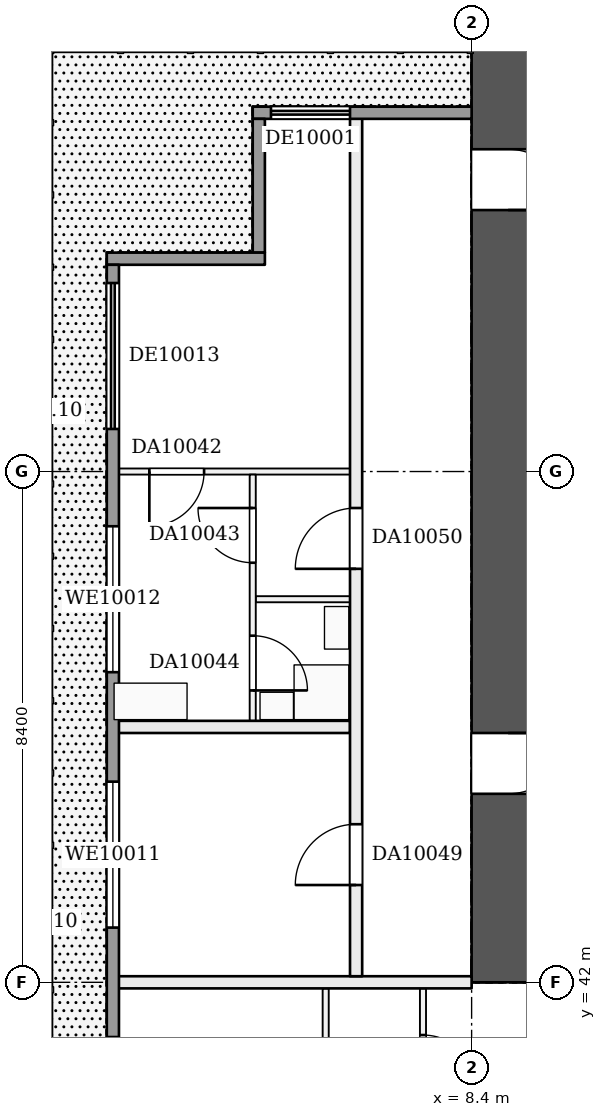
"""IFC4 building model, lengths in metres.
Left out: names, types, materials, properties, quantities, classifications, styles, units other than length and angle.
Written with IfcOpenShell. Run it as: python <this file> out.ifc"""

import sys

from ifc_helpers import new_model, si_unit, direction, frame, frame_2d, origin, place, context, subcontext, project, spatial, rectangle, extrude, element, fill, save


model = new_model("IFC4")
c1 = context("Model", 3, precision=1e-05, world=origin(), true_north=direction((0.0, 1.0)))
c2 = subcontext(c1, "Body", "Model", "MODEL_VIEW")
j1 = project(units=[si_unit("LENGTHUNIT", "METRE"), si_unit("PLANEANGLEUNIT", "RADIAN")], contexts=[c1])
p1 = place(None, origin())
s1 = spatial("IfcSite", under=j1, at=p1, CompositionType="ELEMENT")
p2 = place(p1, origin())
s2 = spatial("IfcBuilding", under=s1, at=p2, CompositionType="ELEMENT")
p3 = place(p2, frame((0.0, 0.0, 46.2)))
s3 = spatial("IfcBuildingStorey", under=s2, at=p3, CompositionType="ELEMENT", Elevation=46.2)
p4 = place(p3, frame((9.0, 58.8, 0.0), z_axis=(0.0, 0.0, 1.0), x_axis=(0.0, -1.0, 0.0)))
e1 = element("IfcWall", 1, at=p4, inside=s3, PredefinedType="SHEAR", context=c2, shape_type="SweptSolid", body=[
    extrude(rectangle(XDim=16.8, YDim=1.2, at=frame_2d((8.4, 0.0))), origin(), (0.0, 0.0, 1.0), 3.22),
])
p5 = place(p4, frame((3.1, 0.0, 0.0)))
e2 = element("IfcOpeningElement", 2, at=p5, cuts=e1, PredefinedType="OPENING", context=c2, shape_type="SweptSolid", body=[
    extrude(rectangle(XDim=1.0, YDim=2.1, at=frame_2d((0.5, 1.05))), frame((0.0, 0.61, 0.0), z_axis=(0.0, -1.0, 0.0), x_axis=(1.0, 0.0, 0.0)), (0.0, 0.0, 1.0), 1.22),
])
p6 = place(p4, frame((12.7, 0.0, 0.0)))
e3 = element("IfcOpeningElement", 3, at=p6, cuts=e1, PredefinedType="OPENING", context=c2, shape_type="SweptSolid", body=[
    extrude(rectangle(XDim=1.0, YDim=2.1, at=frame_2d((0.5, 1.05))), frame((0.0, 0.61, 0.0), z_axis=(0.0, -1.0, 0.0), x_axis=(1.0, 0.0, 0.0)), (0.0, 0.0, 1.0), 1.22),
])
p7 = place(p3, frame((2.5, 42.0, 0.0), z_axis=(0.0, 0.0, 1.0), x_axis=(1.0, 0.0, 0.0)))
e4 = element("IfcWall", 4, at=p7, inside=s3, PredefinedType="PARTITIONING", context=c2, shape_type="SweptSolid", body=[
    extrude(rectangle(XDim=5.9, YDim=0.2, at=frame_2d((2.95, 0.0))), origin(), (0.0, 0.0, 1.0), 3.22),
])
p8 = place(p3, frame((2.5, 46.2, 0.0), z_axis=(0.0, 0.0, 1.0), x_axis=(1.0, 0.0, 0.0)))
e5 = element("IfcWall", 5, at=p8, inside=s3, PredefinedType="PARTITIONING", context=c2, shape_type="SweptSolid", body=[
    extrude(rectangle(XDim=3.9, YDim=0.2, at=frame_2d((1.95, 0.0))), origin(), (0.0, 0.0, 1.0), 3.22),
])
p9 = place(p3, frame((4.85, 48.3, 0.0), z_axis=(0.0, 0.0, 1.0), x_axis=(1.0, 0.0, 0.0)))
e6 = element("IfcWall", 6, at=p9, inside=s3, PredefinedType="PARTITIONING", context=c2, shape_type="SweptSolid", body=[
    extrude(rectangle(XDim=1.55, YDim=0.1, at=frame_2d((0.775, 0.0))), origin(), (0.0, 0.0, 1.0), 3.22),
])
p10 = place(p3, frame((2.5, 50.4, 0.0), z_axis=(0.0, 0.0, 1.0), x_axis=(1.0, 0.0, 0.0)))
e7 = element("IfcWall", 7, at=p10, inside=s3, PredefinedType="PARTITIONING", context=c2, shape_type="SweptSolid", body=[
    extrude(rectangle(XDim=3.9, YDim=0.1, at=frame_2d((1.95, 0.0))), origin(), (0.0, 0.0, 1.0), 3.22),
])
p11 = place(p10, frame((0.6, 0.0, 0.0)))
e8 = element("IfcOpeningElement", 8, at=p11, cuts=e7, PredefinedType="OPENING", context=c2, shape_type="SweptSolid", body=[
    extrude(rectangle(XDim=0.9, YDim=2.1, at=frame_2d((0.45, 1.05))), frame((0.0, 0.06, 0.0), z_axis=(0.0, -1.0, 0.0), x_axis=(1.0, 0.0, 0.0)), (0.0, 0.0, 1.0), 0.12),
])
p12 = place(p3, frame((4.8, 46.3, 0.0), z_axis=(0.0, 0.0, 1.0), x_axis=(0.0, 1.0, 0.0)))
e9 = element("IfcWall", 9, at=p12, inside=s3, PredefinedType="PARTITIONING", context=c2, shape_type="SweptSolid", body=[
    extrude(rectangle(XDim=4.05, YDim=0.1, at=frame_2d((2.025, 0.0))), origin(), (0.0, 0.0, 1.0), 3.22),
])
p13 = place(p12, frame((2.6, 0.0, 0.0)))
e10 = element("IfcOpeningElement", 10, at=p13, cuts=e9, PredefinedType="OPENING", context=c2, shape_type="SweptSolid", body=[
    extrude(rectangle(XDim=0.9, YDim=2.1, at=frame_2d((0.45, 1.05))), frame((0.0, 0.06, 0.0), z_axis=(0.0, -1.0, 0.0), x_axis=(1.0, 0.0, 0.0)), (0.0, 0.0, 1.0), 0.12),
])
p14 = place(p12, frame((0.5, 0.0, 0.0)))
e11 = element("IfcOpeningElement", 11, at=p14, cuts=e9, PredefinedType="OPENING", context=c2, shape_type="SweptSolid", body=[
    extrude(rectangle(XDim=0.9, YDim=2.1, at=frame_2d((0.45, 1.05))), frame((0.0, 0.06, 0.0), z_axis=(0.0, -1.0, 0.0), x_axis=(1.0, 0.0, 0.0)), (0.0, 0.0, 1.0), 0.12),
])
p15 = place(p3, frame((6.0, 33.7, 0.0), z_axis=(0.0, 0.0, 1.0), x_axis=(0.0, 1.0, 0.0)))
e12 = element("IfcWall", 12, at=p15, inside=s3, PredefinedType="PARTITIONING", context=c2, shape_type="SweptSolid", body=[
    extrude(rectangle(XDim=8.2, YDim=0.1, at=frame_2d((4.1, 0.0))), origin(), (0.0, 0.0, 1.0), 3.22),
])
p16 = place(p15, frame((1.5, 0.0, 0.0)))
e13 = element("IfcOpeningElement", 13, at=p16, cuts=e12, PredefinedType="OPENING", context=c2, shape_type="SweptSolid", body=[
    extrude(rectangle(XDim=0.9, YDim=2.1, at=frame_2d((0.45, 1.05))), frame((0.0, 0.06, 0.0), z_axis=(0.0, -1.0, 0.0), x_axis=(1.0, 0.0, 0.0)), (0.0, 0.0, 1.0), 0.12),
])
p17 = place(p15, frame((5.7, 0.0, 0.0)))
e14 = element("IfcOpeningElement", 14, at=p17, cuts=e12, PredefinedType="OPENING", context=c2, shape_type="SweptSolid", body=[
    extrude(rectangle(XDim=0.9, YDim=2.1, at=frame_2d((0.45, 1.05))), frame((0.0, 0.06, 0.0), z_axis=(0.0, -1.0, 0.0), x_axis=(1.0, 0.0, 0.0)), (0.0, 0.0, 1.0), 0.12),
])
p18 = place(p3, frame((6.5, 42.1, 0.0), z_axis=(0.0, 0.0, 1.0), x_axis=(0.0, 1.0, 0.0)))
e15 = element("IfcWall", 15, at=p18, inside=s3, PredefinedType="PARTITIONING", context=c2, shape_type="SweptSolid", body=[
    extrude(rectangle(XDim=14.2, YDim=0.2, at=frame_2d((7.1, 0.0))), origin(), (0.0, 0.0, 1.0), 3.22),
])
p19 = place(p18, frame((1.5, 0.0, 0.0)))
e16 = element("IfcOpeningElement", 16, at=p19, cuts=e15, PredefinedType="OPENING", context=c2, shape_type="SweptSolid", body=[
    extrude(rectangle(XDim=1.0, YDim=2.1, at=frame_2d((0.5, 1.05))), frame((0.0, 0.11, 0.0), z_axis=(0.0, -1.0, 0.0), x_axis=(1.0, 0.0, 0.0)), (0.0, 0.0, 1.0), 0.22),
])
p20 = place(p18, frame((6.7, 0.0, 0.0)))
e17 = element("IfcOpeningElement", 17, at=p20, cuts=e15, PredefinedType="OPENING", context=c2, shape_type="SweptSolid", body=[
    extrude(rectangle(XDim=1.0, YDim=2.1, at=frame_2d((0.5, 1.05))), frame((0.0, 0.11, 0.0), z_axis=(0.0, -1.0, 0.0), x_axis=(1.0, 0.0, 0.0)), (0.0, 0.0, 1.0), 0.22),
])
p21 = place(p3, frame((7.6, 33.7, 0.0), z_axis=(0.0, 0.0, 1.0), x_axis=(0.0, 1.0, 0.0)))
e18 = element("IfcWall", 18, at=p21, inside=s3, PredefinedType="PARTITIONING", context=c2, shape_type="SweptSolid", body=[
    extrude(rectangle(XDim=8.2, YDim=0.1, at=frame_2d((4.1, 0.0))), origin(), (0.0, 0.0, 1.0), 3.22),
])
p22 = place(p21, frame((0.8, 0.0, 0.0)))
e19 = element("IfcOpeningElement", 19, at=p22, cuts=e18, PredefinedType="OPENING", context=c2, shape_type="SweptSolid", body=[
    extrude(rectangle(XDim=0.9, YDim=2.1, at=frame_2d((0.45, 1.05))), frame((0.0, 0.06, 0.0), z_axis=(0.0, -1.0, 0.0), x_axis=(1.0, 0.0, 0.0)), (0.0, 0.0, 1.0), 0.12),
])
p23 = place(p21, frame((3.567, 0.0, 0.0)))
e20 = element("IfcOpeningElement", 20, at=p23, cuts=e18, PredefinedType="OPENING", context=c2, shape_type="SweptSolid", body=[
    extrude(rectangle(XDim=0.9, YDim=2.1, at=frame_2d((0.45, 1.05))), frame((0.0, 0.06, 0.0), z_axis=(0.0, -1.0, 0.0), x_axis=(1.0, 0.0, 0.0)), (0.0, 0.0, 1.0), 0.12),
])
p24 = place(p21, frame((6.533, 0.0, 0.0)))
e21 = element("IfcOpeningElement", 21, at=p24, cuts=e18, PredefinedType="OPENING", context=c2, shape_type="SweptSolid", body=[
    extrude(rectangle(XDim=0.9, YDim=2.1, at=frame_2d((0.45, 1.05))), frame((0.0, 0.06, 0.0), z_axis=(0.0, -1.0, 0.0), x_axis=(1.0, 0.0, 0.0)), (0.0, 0.0, 1.0), 0.12),
])
p25 = place(p3, frame((8.4, 56.3, 0.0), z_axis=(0.0, 0.0, 1.0), x_axis=(-1.0, 0.0, 0.0)))
e22 = element("IfcWall", 22, at=p25, inside=s3, PredefinedType="SOLIDWALL", context=c2, shape_type="SweptSolid", body=[
    extrude(rectangle(XDim=3.6, YDim=0.2, at=frame_2d((1.8, 0.0))), origin(), (0.0, 0.0, 1.0), 3.22),
])
p26 = place(p25, frame((2.0, 0.0, 0.0)))
e23 = element("IfcOpeningElement", 23, at=p26, cuts=e22, PredefinedType="OPENING", context=c2, shape_type="SweptSolid", body=[
    extrude(rectangle(XDim=1.3, YDim=2.2, at=frame_2d((0.65, 1.1))), frame((0.0, 0.11, 0.0), z_axis=(0.0, -1.0, 0.0), x_axis=(1.0, 0.0, 0.0)), (0.0, 0.0, 1.0), 0.22),
])
p27 = place(p3, frame((4.9, 56.2, 0.0), z_axis=(0.0, 0.0, 1.0), x_axis=(0.0, -1.0, 0.0)))
e24 = element("IfcWall", 24, at=p27, inside=s3, PredefinedType="SOLIDWALL", context=c2, shape_type="SweptSolid", body=[
    extrude(rectangle(XDim=2.2, YDim=0.2, at=frame_2d((1.1, 0.0))), origin(), (0.0, 0.0, 1.0), 3.22),
])
p28 = place(p3, frame((5.0, 53.9, 0.0), z_axis=(0.0, 0.0, 1.0), x_axis=(-1.0, 0.0, 0.0)))
e25 = element("IfcWall", 25, at=p28, inside=s3, PredefinedType="SOLIDWALL", context=c2, shape_type="SweptSolid", body=[
    extrude(rectangle(XDim=2.6, YDim=0.2, at=frame_2d((1.3, 0.0))), origin(), (0.0, 0.0, 1.0), 3.22),
])
p29 = place(p3, frame((2.5, 53.8, 0.0), z_axis=(0.0, 0.0, 1.0), x_axis=(0.0, -1.0, 0.0)))
e26 = element("IfcWall", 26, at=p29, inside=s3, PredefinedType="SOLIDWALL", context=c2, shape_type="SweptSolid", body=[
    extrude(rectangle(XDim=48.8, YDim=0.2, at=frame_2d((24.4, 0.0))), origin(), (0.0, 0.0, 1.0), 3.22),
])
p30 = place(p29, frame((46.1, 0.0, 0.0)))
e27 = element("IfcOpeningElement", 27, at=p30, cuts=e26, PredefinedType="OPENING", context=c2, shape_type="SweptSolid", body=[
    extrude(rectangle(XDim=2.4, YDim=2.2, at=frame_2d((1.2, 1.1))), frame((0.0, 0.11, 0.0), z_axis=(0.0, -1.0, 0.0), x_axis=(1.0, 0.0, 0.0)), (0.0, 0.0, 1.0), 0.22),
])
p31 = place(p29, frame((42.1, 0.0, 0.0)))
e28 = element("IfcOpeningElement", 28, at=p31, cuts=e26, PredefinedType="OPENING", context=c2, shape_type="SweptSolid", body=[
    extrude(rectangle(XDim=2.4, YDim=2.2, at=frame_2d((1.2, 1.1))), frame((0.0, 0.11, 0.0), z_axis=(0.0, -1.0, 0.0), x_axis=(1.0, 0.0, 0.0)), (0.0, 0.0, 1.0), 0.22),
])
p32 = place(p29, frame((37.9, 0.0, 0.0)))
e29 = element("IfcOpeningElement", 29, at=p32, cuts=e26, PredefinedType="OPENING", context=c2, shape_type="SweptSolid", body=[
    extrude(rectangle(XDim=2.4, YDim=2.2, at=frame_2d((1.2, 1.1))), frame((0.0, 0.11, 0.0), z_axis=(0.0, -1.0, 0.0), x_axis=(1.0, 0.0, 0.0)), (0.0, 0.0, 1.0), 0.22),
])
p33 = place(p29, frame((33.7, 0.0, 0.0)))
e30 = element("IfcOpeningElement", 30, at=p33, cuts=e26, PredefinedType="OPENING", context=c2, shape_type="SweptSolid", body=[
    extrude(rectangle(XDim=2.4, YDim=2.2, at=frame_2d((1.2, 1.1))), frame((0.0, 0.11, 0.0), z_axis=(0.0, -1.0, 0.0), x_axis=(1.0, 0.0, 0.0)), (0.0, 0.0, 1.0), 0.22),
])
p34 = place(p29, frame((29.5, 0.0, 0.9)))
e31 = element("IfcOpeningElement", 31, at=p34, cuts=e26, PredefinedType="OPENING", context=c2, shape_type="SweptSolid", body=[
    extrude(rectangle(XDim=2.4, YDim=1.5, at=frame_2d((1.2, 0.75))), frame((0.0, 0.11, 0.0), z_axis=(0.0, -1.0, 0.0), x_axis=(1.0, 0.0, 0.0)), (0.0, 0.0, 1.0), 0.22),
])
p35 = place(p29, frame((25.3, 0.0, 0.9)))
e32 = element("IfcOpeningElement", 32, at=p35, cuts=e26, PredefinedType="OPENING", context=c2, shape_type="SweptSolid", body=[
    extrude(rectangle(XDim=2.4, YDim=1.5, at=frame_2d((1.2, 0.75))), frame((0.0, 0.11, 0.0), z_axis=(0.0, -1.0, 0.0), x_axis=(1.0, 0.0, 0.0)), (0.0, 0.0, 1.0), 0.22),
])
p36 = place(p29, frame((21.1, 0.0, 0.0)))
e33 = element("IfcOpeningElement", 33, at=p36, cuts=e26, PredefinedType="OPENING", context=c2, shape_type="SweptSolid", body=[
    extrude(rectangle(XDim=2.4, YDim=2.2, at=frame_2d((1.2, 1.1))), frame((0.0, 0.11, 0.0), z_axis=(0.0, -1.0, 0.0), x_axis=(1.0, 0.0, 0.0)), (0.0, 0.0, 1.0), 0.22),
])
p37 = place(p29, frame((16.9, 0.0, 0.0)))
e34 = element("IfcOpeningElement", 34, at=p37, cuts=e26, PredefinedType="OPENING", context=c2, shape_type="SweptSolid", body=[
    extrude(rectangle(XDim=2.4, YDim=2.2, at=frame_2d((1.2, 1.1))), frame((0.0, 0.11, 0.0), z_axis=(0.0, -1.0, 0.0), x_axis=(1.0, 0.0, 0.0)), (0.0, 0.0, 1.0), 0.22),
])
p38 = place(p29, frame((12.7, 0.0, 0.9)))
e35 = element("IfcOpeningElement", 35, at=p38, cuts=e26, PredefinedType="OPENING", context=c2, shape_type="SweptSolid", body=[
    extrude(rectangle(XDim=2.4, YDim=1.5, at=frame_2d((1.2, 0.75))), frame((0.0, 0.11, 0.0), z_axis=(0.0, -1.0, 0.0), x_axis=(1.0, 0.0, 0.0)), (0.0, 0.0, 1.0), 0.22),
])
p39 = place(p29, frame((8.5, 0.0, 0.9)))
e36 = element("IfcOpeningElement", 36, at=p39, cuts=e26, PredefinedType="OPENING", context=c2, shape_type="SweptSolid", body=[
    extrude(rectangle(XDim=2.4, YDim=1.5, at=frame_2d((1.2, 0.75))), frame((0.0, 0.11, 0.0), z_axis=(0.0, -1.0, 0.0), x_axis=(1.0, 0.0, 0.0)), (0.0, 0.0, 1.0), 0.22),
])
p40 = place(p29, frame((4.3, 0.0, 0.9)))
e37 = element("IfcOpeningElement", 37, at=p40, cuts=e26, PredefinedType="OPENING", context=c2, shape_type="SweptSolid", body=[
    extrude(rectangle(XDim=2.4, YDim=1.5, at=frame_2d((1.2, 0.75))), frame((0.0, 0.11, 0.0), z_axis=(0.0, -1.0, 0.0), x_axis=(1.0, 0.0, 0.0)), (0.0, 0.0, 1.0), 0.22),
])
p41 = place(p29, frame((0.3, 0.0, 0.0)))
e38 = element("IfcOpeningElement", 38, at=p41, cuts=e26, PredefinedType="OPENING", context=c2, shape_type="SweptSolid", body=[
    extrude(rectangle(XDim=2.4, YDim=2.2, at=frame_2d((1.2, 1.1))), frame((0.0, 0.11, 0.0), z_axis=(0.0, -1.0, 0.0), x_axis=(1.0, 0.0, 0.0)), (0.0, 0.0, 1.0), 0.22),
])
p42 = place(p5, origin())
e39 = element("IfcDoor", 39, at=p42, inside=s3, OperationType="SINGLE_SWING_RIGHT", PredefinedType="DOOR", context=c2, shape_type="SweptSolid", body=[
    extrude(rectangle(XDim=1.0, YDim=2.1, at=frame_2d((0.5, 1.05))), frame((0.0, 0.025, 0.0), z_axis=(0.0, -1.0, 0.0), x_axis=(1.0, 0.0, 0.0)), (0.0, 0.0, 1.0), 0.05),
])
fill(e2, e39)
p43 = place(p6, origin())
e40 = element("IfcDoor", 40, at=p43, inside=s3, OperationType="SINGLE_SWING_LEFT", PredefinedType="DOOR", context=c2, shape_type="SweptSolid", body=[
    extrude(rectangle(XDim=1.0, YDim=2.1, at=frame_2d((0.5, 1.05))), frame((0.0, 0.025, 0.0), z_axis=(0.0, -1.0, 0.0), x_axis=(1.0, 0.0, 0.0)), (0.0, 0.0, 1.0), 0.05),
])
fill(e3, e40)
p44 = place(p11, frame((0.9, 0.0, 0.0), z_axis=(0.0, 0.0, 1.0), x_axis=(-1.0, 0.0, 0.0)))
e41 = element("IfcDoor", 41, at=p44, inside=s3, OperationType="SINGLE_SWING_RIGHT", PredefinedType="DOOR", context=c2, shape_type="SweptSolid", body=[
    extrude(rectangle(XDim=0.9, YDim=2.1, at=frame_2d((0.45, 1.05))), frame((0.0, 0.025, 0.0), z_axis=(0.0, -1.0, 0.0), x_axis=(1.0, 0.0, 0.0)), (0.0, 0.0, 1.0), 0.05),
])
fill(e8, e41)
p45 = place(p13, origin())
e42 = element("IfcDoor", 42, at=p45, inside=s3, OperationType="SINGLE_SWING_RIGHT", PredefinedType="DOOR", context=c2, shape_type="SweptSolid", body=[
    extrude(rectangle(XDim=0.9, YDim=2.1, at=frame_2d((0.45, 1.05))), frame((0.0, 0.025, 0.0), z_axis=(0.0, -1.0, 0.0), x_axis=(1.0, 0.0, 0.0)), (0.0, 0.0, 1.0), 0.05),
])
fill(e10, e42)
p46 = place(p14, frame((0.9, 0.0, 0.0), z_axis=(0.0, 0.0, 1.0), x_axis=(-1.0, 0.0, 0.0)))
e43 = element("IfcDoor", 43, at=p46, inside=s3, OperationType="SINGLE_SWING_RIGHT", PredefinedType="DOOR", context=c2, shape_type="SweptSolid", body=[
    extrude(rectangle(XDim=0.9, YDim=2.1, at=frame_2d((0.45, 1.05))), frame((0.0, 0.025, 0.0), z_axis=(0.0, -1.0, 0.0), x_axis=(1.0, 0.0, 0.0)), (0.0, 0.0, 1.0), 0.05),
])
fill(e11, e43)
p47 = place(p19, origin())
e44 = element("IfcDoor", 44, at=p47, inside=s3, OperationType="SINGLE_SWING_LEFT", PredefinedType="DOOR", context=c2, shape_type="SweptSolid", body=[
    extrude(rectangle(XDim=1.0, YDim=2.1, at=frame_2d((0.5, 1.05))), frame((0.0, 0.025, 0.0), z_axis=(0.0, -1.0, 0.0), x_axis=(1.0, 0.0, 0.0)), (0.0, 0.0, 1.0), 0.05),
])
fill(e16, e44)
p48 = place(p20, origin())
e45 = element("IfcDoor", 45, at=p48, inside=s3, OperationType="SINGLE_SWING_LEFT", PredefinedType="DOOR", context=c2, shape_type="SweptSolid", body=[
    extrude(rectangle(XDim=1.0, YDim=2.1, at=frame_2d((0.5, 1.05))), frame((0.0, 0.025, 0.0), z_axis=(0.0, -1.0, 0.0), x_axis=(1.0, 0.0, 0.0)), (0.0, 0.0, 1.0), 0.05),
])
fill(e17, e45)
p49 = place(p24, frame((0.9, 0.0, 0.0), z_axis=(0.0, 0.0, 1.0), x_axis=(-1.0, 0.0, 0.0)))
e46 = element("IfcDoor", 46, at=p49, inside=s3, OperationType="SINGLE_SWING_RIGHT", PredefinedType="DOOR", context=c2, shape_type="SweptSolid", body=[
    extrude(rectangle(XDim=0.9, YDim=2.1, at=frame_2d((0.45, 1.05))), frame((0.0, 0.025, 0.0), z_axis=(0.0, -1.0, 0.0), x_axis=(1.0, 0.0, 0.0)), (0.0, 0.0, 1.0), 0.05),
])
fill(e21, e46)
p50 = place(p26, origin())
e47 = element("IfcDoor", 47, at=p50, inside=s3, OperationType="DOUBLE_DOOR_SLIDING", PredefinedType="DOOR", context=c2, shape_type="SweptSolid", body=[
    extrude(rectangle(XDim=1.3, YDim=2.2, at=frame_2d((0.65, 1.1))), frame((0.0, 0.025, 0.0), z_axis=(0.0, -1.0, 0.0), x_axis=(1.0, 0.0, 0.0)), (0.0, 0.0, 1.0), 0.05),
])
fill(e23, e47)
p51 = place(p39, origin())
e48 = element("IfcWindow", 48, at=p51, inside=s3, PartitioningType="SINGLE_PANEL", PredefinedType="WINDOW", context=c2, shape_type="SweptSolid", body=[
    extrude(rectangle(XDim=2.4, YDim=1.5, at=frame_2d((1.2, 0.75))), frame((0.0, 0.03, 0.0), z_axis=(0.0, -1.0, 0.0), x_axis=(1.0, 0.0, 0.0)), (0.0, 0.0, 1.0), 0.06),
])
fill(e36, e48)
p52 = place(p40, origin())
e49 = element("IfcWindow", 49, at=p52, inside=s3, PartitioningType="SINGLE_PANEL", PredefinedType="WINDOW", context=c2, shape_type="SweptSolid", body=[
    extrude(rectangle(XDim=2.4, YDim=1.5, at=frame_2d((1.2, 0.75))), frame((0.0, 0.03, 0.0), z_axis=(0.0, -1.0, 0.0), x_axis=(1.0, 0.0, 0.0)), (0.0, 0.0, 1.0), 0.06),
])
fill(e37, e49)
p53 = place(p41, origin())
e50 = element("IfcDoor", 50, at=p53, inside=s3, OperationType="DOUBLE_DOOR_SLIDING", PredefinedType="DOOR", context=c2, shape_type="SweptSolid", body=[
    extrude(rectangle(XDim=2.4, YDim=2.2, at=frame_2d((1.2, 1.1))), frame((0.0, 0.025, 0.0), z_axis=(0.0, -1.0, 0.0), x_axis=(1.0, 0.0, 0.0)), (0.0, 0.0, 1.0), 0.05),
])
fill(e38, e50)
save(model, sys.argv[1])
